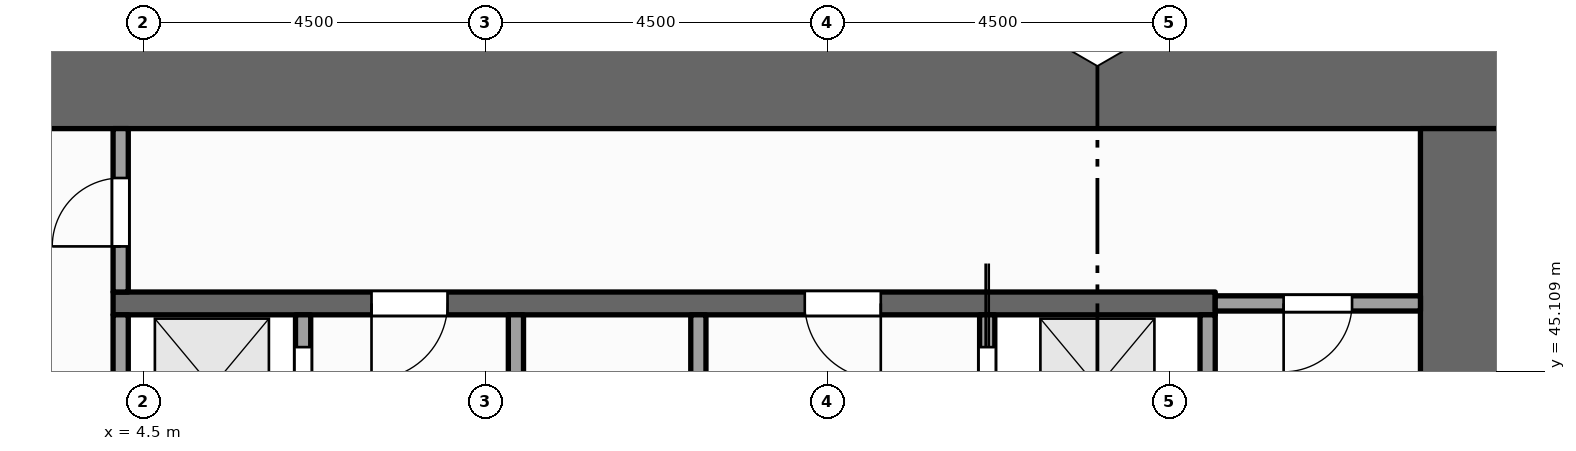
"""IFC4 building model, lengths in metres.
Left out: names, types, materials, properties, quantities, classifications, styles, units other than length and angle.
Written with IfcOpenShell. Run it as: python <this file> out.ifc"""

import sys

from ifc_helpers import new_model, si_unit, direction, frame, frame_2d, origin, place, context, subcontext, project, spatial, rectangle, extrude, element, fill, save


model = new_model("IFC4")
c1 = context("Model", 3, precision=1e-05, world=origin(), true_north=direction((0.0, 1.0)))
c2 = subcontext(c1, "Body", "Model", "MODEL_VIEW")
j1 = project(units=[si_unit("LENGTHUNIT", "METRE"), si_unit("PLANEANGLEUNIT", "RADIAN")], contexts=[c1])
p1 = place(None, origin())
s1 = spatial("IfcSite", under=j1, at=p1, CompositionType="ELEMENT")
p2 = place(p1, origin())
s2 = spatial("IfcBuilding", under=s1, at=p2, CompositionType="ELEMENT")
p3 = place(p2, frame((0.0, 0.0, 33.0)))
s3 = spatial("IfcBuildingStorey", under=s2, at=p3, CompositionType="ELEMENT", Elevation=33.0)
p4 = place(p3, frame((0.0, 48.9, -0.15), z_axis=(0.0, 0.0, 1.0), x_axis=(1.0, 0.0, 0.0)))
e1 = element("IfcWall", 1, at=p4, inside=s3, PredefinedType="SHEAR", context=c2, shape_type="SweptSolid", body=[
    extrude(rectangle(XDim=22.5, YDim=1.2, at=frame_2d((11.25, 0.0))), origin(), (0.0, 0.0, 1.0), 4.0),
])
p5 = place(p3, frame((21.9, 37.2, -0.15), z_axis=(0.0, 0.0, 1.0), x_axis=(0.0, 1.0, 0.0)))
e2 = element("IfcWall", 2, at=p5, inside=s3, PredefinedType="SHEAR", context=c2, shape_type="SweptSolid", body=[
    extrude(rectangle(XDim=11.1, YDim=1.2, at=frame_2d((5.55, 0.0))), origin(), (0.0, 0.0, 1.0), 4.0),
])
p6 = place(p3, frame((4.2, 43.525, 0.0), z_axis=(0.0, 0.0, 1.0), x_axis=(0.0, 1.0, 0.0)))
e3 = element("IfcWall", 3, at=p6, inside=s3, PredefinedType="SOLIDWALL", context=c2, shape_type="SweptSolid", body=[
    extrude(rectangle(XDim=2.325, YDim=0.2, at=frame_2d((1.163, 0.0))), origin(), (0.0, 0.0, 1.0), 3.85),
])
p7 = place(p3, frame((4.2, 46.15, 0.0), z_axis=(0.0, 0.0, 1.0), x_axis=(0.0, 1.0, 0.0)))
e4 = element("IfcWall", 4, at=p7, inside=s3, PredefinedType="PARTITIONING", context=c2, shape_type="SweptSolid", body=[
    extrude(rectangle(XDim=2.15, YDim=0.2, at=frame_2d((1.075, 0.0))), origin(), (0.0, 0.0, 1.0), 3.85),
])
p8 = place(p7, frame((0.6, 0.0, 0.0)))
e5 = element("IfcOpeningElement", 5, at=p8, cuts=e4, PredefinedType="OPENING", context=c2, shape_type="SweptSolid", body=[
    extrude(rectangle(XDim=0.9, YDim=2.1, at=frame_2d((0.45, 1.05))), frame((0.0, 0.11, 0.0), z_axis=(0.0, -1.0, 0.0), x_axis=(1.0, 0.0, 0.0)), (0.0, 0.0, 1.0), 0.22),
])
p9 = place(p3, frame((6.6, 37.2, 0.0), z_axis=(0.0, 0.0, 1.0), x_axis=(0.0, 1.0, 0.0)))
e6 = element("IfcWall", 6, at=p9, inside=s3, PredefinedType="SOLIDWALL", context=c2, shape_type="SweptSolid", body=[
    extrude(rectangle(XDim=8.65, YDim=0.2, at=frame_2d((4.325, 0.0))), origin(), (0.0, 0.0, 1.0), 3.85),
])
p10 = place(p9, frame((0.5, 0.0, 0.012)))
e7 = element("IfcOpeningElement", 7, at=p10, cuts=e6, PredefinedType="OPENING", context=c2, shape_type="SweptSolid", body=[
    extrude(rectangle(XDim=1.1, YDim=2.1, at=frame_2d((0.55, 1.05))), frame((0.0, 0.11, 0.0), z_axis=(0.0, -1.0, 0.0), x_axis=(1.0, 0.0, 0.0)), (0.0, 0.0, 1.0), 0.22),
])
p11 = place(p9, frame((2.75, 0.0, 0.012)))
e8 = element("IfcOpeningElement", 8, at=p11, cuts=e6, PredefinedType="OPENING", context=c2, shape_type="SweptSolid", body=[
    extrude(rectangle(XDim=1.1, YDim=2.1, at=frame_2d((0.55, 1.05))), frame((0.0, 0.11, 0.0), z_axis=(0.0, -1.0, 0.0), x_axis=(1.0, 0.0, 0.0)), (0.0, 0.0, 1.0), 0.22),
])
p12 = place(p9, frame((4.95, 0.0, 0.012)))
e9 = element("IfcOpeningElement", 9, at=p12, cuts=e6, PredefinedType="OPENING", context=c2, shape_type="SweptSolid", body=[
    extrude(rectangle(XDim=1.1, YDim=2.1, at=frame_2d((0.55, 1.05))), frame((0.0, 0.11, 0.0), z_axis=(0.0, -1.0, 0.0), x_axis=(1.0, 0.0, 0.0)), (0.0, 0.0, 1.0), 0.22),
])
p13 = place(p9, frame((7.125, 0.0, 0.012)))
e10 = element("IfcOpeningElement", 10, at=p13, cuts=e6, PredefinedType="OPENING", context=c2, shape_type="SweptSolid", body=[
    extrude(rectangle(XDim=1.1, YDim=2.1, at=frame_2d((0.55, 1.05))), frame((0.0, 0.11, 0.0), z_axis=(0.0, -1.0, 0.0), x_axis=(1.0, 0.0, 0.0)), (0.0, 0.0, 1.0), 0.22),
])
p14 = place(p3, frame((9.4, 37.2, 0.0), z_axis=(0.0, 0.0, 1.0), x_axis=(0.0, 1.0, 0.0)))
e11 = element("IfcWall", 11, at=p14, inside=s3, PredefinedType="PARTITIONING", context=c2, shape_type="SweptSolid", body=[
    extrude(rectangle(XDim=8.65, YDim=0.2, at=frame_2d((4.325, 0.0))), origin(), (0.0, 0.0, 1.0), 3.85),
])
p15 = place(p14, frame((1.7, 0.0, 0.0)))
e12 = element("IfcOpeningElement", 12, at=p15, cuts=e11, PredefinedType="OPENING", context=c2, shape_type="SweptSolid", body=[
    extrude(rectangle(XDim=0.9, YDim=2.1, at=frame_2d((0.45, 1.05))), frame((0.0, 0.11, 0.0), z_axis=(0.0, -1.0, 0.0), x_axis=(1.0, 0.0, 0.0)), (0.0, 0.0, 1.0), 0.22),
])
p16 = place(p14, frame((6.125, 0.0, 0.0)))
e13 = element("IfcOpeningElement", 13, at=p16, cuts=e11, PredefinedType="OPENING", context=c2, shape_type="SweptSolid", body=[
    extrude(rectangle(XDim=0.9, YDim=2.1, at=frame_2d((0.45, 1.05))), frame((0.0, 0.11, 0.0), z_axis=(0.0, -1.0, 0.0), x_axis=(1.0, 0.0, 0.0)), (0.0, 0.0, 1.0), 0.22),
])
p17 = place(p3, frame((11.8, 37.2, 0.0), z_axis=(0.0, 0.0, 1.0), x_axis=(0.0, 1.0, 0.0)))
e14 = element("IfcWall", 14, at=p17, inside=s3, PredefinedType="PARTITIONING", context=c2, shape_type="SweptSolid", body=[
    extrude(rectangle(XDim=8.65, YDim=0.2, at=frame_2d((4.325, 0.0))), origin(), (0.0, 0.0, 1.0), 3.85),
])
p18 = place(p3, frame((15.6, 43.7, 0.0), z_axis=(0.0, 0.0, 1.0), x_axis=(0.0, 1.0, 0.0)))
e15 = element("IfcWall", 15, at=p18, inside=s3, PredefinedType="SOLIDWALL", context=c2, shape_type="SweptSolid", body=[
    extrude(rectangle(XDim=2.15, YDim=0.2, at=frame_2d((1.075, 0.0))), origin(), (0.0, 0.0, 1.0), 3.85),
])
p19 = place(p18, frame((0.625, 0.0, 0.012)))
e16 = element("IfcOpeningElement", 16, at=p19, cuts=e15, PredefinedType="OPENING", context=c2, shape_type="SweptSolid", body=[
    extrude(rectangle(XDim=1.1, YDim=2.1, at=frame_2d((0.55, 1.05))), frame((0.0, 0.11, 0.0), z_axis=(0.0, -1.0, 0.0), x_axis=(1.0, 0.0, 0.0)), (0.0, 0.0, 1.0), 0.22),
])
p20 = place(p3, frame((18.5, 43.7, 0.0), z_axis=(0.0, 0.0, 1.0), x_axis=(0.0, 1.0, 0.0)))
e17 = element("IfcWall", 17, at=p20, inside=s3, PredefinedType="SOLIDWALL", context=c2, shape_type="SweptSolid", body=[
    extrude(rectangle(XDim=2.15, YDim=0.2, at=frame_2d((1.075, 0.0))), origin(), (0.0, 0.0, 1.0), 3.85),
])
p21 = place(p3, frame((4.1, 46.0, 0.0), z_axis=(0.0, 0.0, 1.0), x_axis=(1.0, 0.0, 0.0)))
e18 = element("IfcWall", 18, at=p21, inside=s3, PredefinedType="SHEAR", context=c2, shape_type="SweptSolid", body=[
    extrude(rectangle(XDim=14.5, YDim=0.3, at=frame_2d((7.25, 0.0))), origin(), (0.0, 0.0, 1.0), 3.85),
])
p22 = place(p21, frame((3.4, 0.0, 0.0)))
e19 = element("IfcOpeningElement", 19, at=p22, cuts=e18, PredefinedType="OPENING", context=c2, shape_type="SweptSolid", body=[
    extrude(rectangle(XDim=1.0, YDim=2.1, at=frame_2d((0.5, 1.05))), frame((0.0, 0.16, 0.0), z_axis=(0.0, -1.0, 0.0), x_axis=(1.0, 0.0, 0.0)), (0.0, 0.0, 1.0), 0.32),
])
p23 = place(p21, frame((9.1, 0.0, 0.0)))
e20 = element("IfcOpeningElement", 20, at=p23, cuts=e18, PredefinedType="OPENING", context=c2, shape_type="SweptSolid", body=[
    extrude(rectangle(XDim=1.0, YDim=2.1, at=frame_2d((0.5, 1.05))), frame((0.0, 0.16, 0.0), z_axis=(0.0, -1.0, 0.0), x_axis=(1.0, 0.0, 0.0)), (0.0, 0.0, 1.0), 0.32),
])
p24 = place(p3, frame((18.6, 46.0, 0.0), z_axis=(0.0, 0.0, 1.0), x_axis=(1.0, 0.0, 0.0)))
e21 = element("IfcWall", 21, at=p24, inside=s3, PredefinedType="PARTITIONING", context=c2, shape_type="SweptSolid", body=[
    extrude(rectangle(XDim=2.7, YDim=0.2, at=frame_2d((1.35, 0.0))), origin(), (0.0, 0.0, 1.0), 3.85),
])
p25 = place(p24, frame((0.9, 0.0, 0.0)))
e22 = element("IfcOpeningElement", 22, at=p25, cuts=e21, PredefinedType="OPENING", context=c2, shape_type="SweptSolid", body=[
    extrude(rectangle(XDim=0.9, YDim=2.1, at=frame_2d((0.45, 1.05))), frame((0.0, 0.11, 0.0), z_axis=(0.0, -1.0, 0.0), x_axis=(1.0, 0.0, 0.0)), (0.0, 0.0, 1.0), 0.22),
])
p26 = place(p13, origin())
e23 = element("IfcDoor", 23, at=p26, inside=s3, OperationType="SLIDING_TO_LEFT", PredefinedType="DOOR", context=c2, shape_type="SweptSolid", body=[
    extrude(rectangle(XDim=1.1, YDim=2.1, at=frame_2d((0.55, 1.05))), frame((0.0, 0.025, 0.0), z_axis=(0.0, -1.0, 0.0), x_axis=(1.0, 0.0, 0.0)), (0.0, 0.0, 1.0), 0.05),
])
fill(e10, e23)
p27 = place(p19, origin())
e24 = element("IfcDoor", 24, at=p27, inside=s3, OperationType="SLIDING_TO_RIGHT", PredefinedType="DOOR", context=c2, shape_type="SweptSolid", body=[
    extrude(rectangle(XDim=1.1, YDim=2.1, at=frame_2d((0.55, 1.05))), frame((0.0, 0.025, 0.0), z_axis=(0.0, -1.0, 0.0), x_axis=(1.0, 0.0, 0.0)), (0.0, 0.0, 1.0), 0.05),
])
fill(e16, e24)
p28 = place(p22, origin())
e25 = element("IfcDoor", 25, at=p28, inside=s3, OperationType="SINGLE_SWING_LEFT", PredefinedType="DOOR", context=c2, shape_type="SweptSolid", body=[
    extrude(rectangle(XDim=1.0, YDim=2.1, at=frame_2d((0.5, 1.05))), frame((0.0, 0.025, 0.0), z_axis=(0.0, -1.0, 0.0), x_axis=(1.0, 0.0, 0.0)), (0.0, 0.0, 1.0), 0.05),
])
fill(e19, e25)
p29 = place(p23, origin())
e26 = element("IfcDoor", 26, at=p29, inside=s3, OperationType="SINGLE_SWING_RIGHT", PredefinedType="DOOR", context=c2, shape_type="SweptSolid", body=[
    extrude(rectangle(XDim=1.0, YDim=2.1, at=frame_2d((0.5, 1.05))), frame((0.0, 0.025, 0.0), z_axis=(0.0, -1.0, 0.0), x_axis=(1.0, 0.0, 0.0)), (0.0, 0.0, 1.0), 0.05),
])
fill(e20, e26)
p30 = place(p8, origin())
e27 = element("IfcDoor", 27, at=p30, inside=s3, OperationType="SINGLE_SWING_LEFT", PredefinedType="DOOR", context=c2, shape_type="SweptSolid", body=[
    extrude(rectangle(XDim=0.9, YDim=2.1, at=frame_2d((0.45, 1.05))), frame((0.0, 0.025, 0.0), z_axis=(0.0, -1.0, 0.0), x_axis=(1.0, 0.0, 0.0)), (0.0, 0.0, 1.0), 0.05),
])
fill(e5, e27)
p31 = place(p25, origin())
e28 = element("IfcDoor", 28, at=p31, inside=s3, OperationType="SINGLE_SWING_LEFT", PredefinedType="DOOR", context=c2, shape_type="SweptSolid", body=[
    extrude(rectangle(XDim=0.9, YDim=2.1, at=frame_2d((0.45, 1.05))), frame((0.0, 0.025, 0.0), z_axis=(0.0, -1.0, 0.0), x_axis=(1.0, 0.0, 0.0)), (0.0, 0.0, 1.0), 0.05),
])
fill(e22, e28)
save(model, sys.argv[1])
